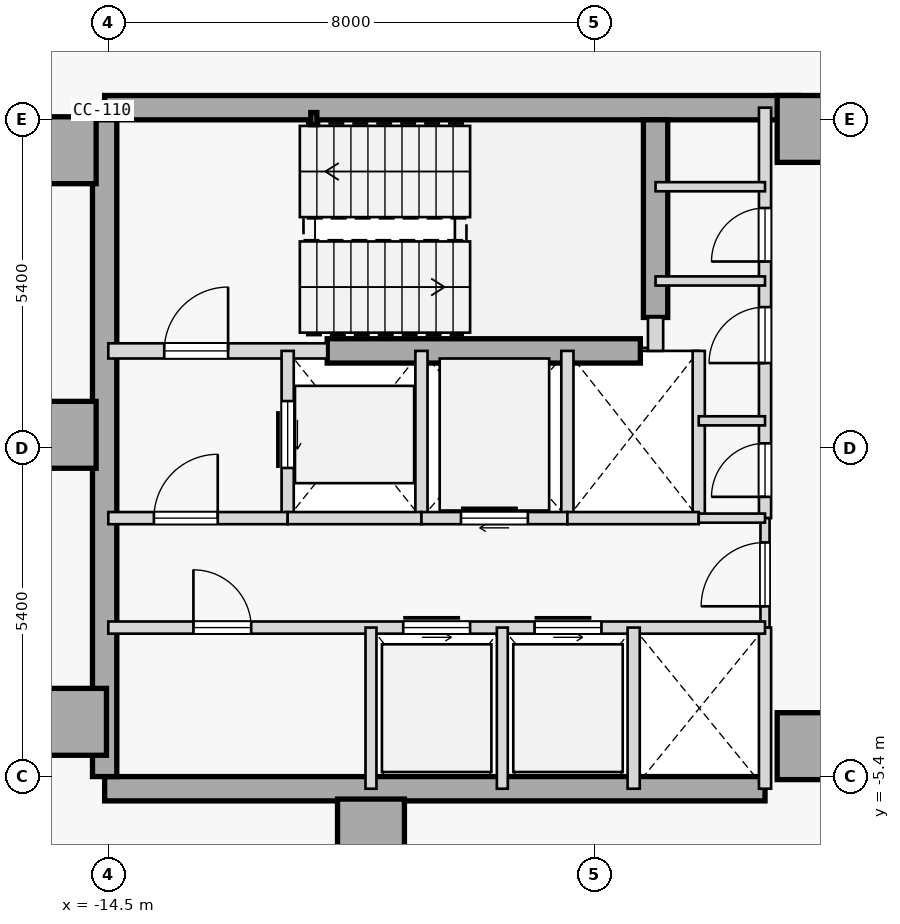
"""IFC4 building model, lengths in metres.
Left out: names, types, materials, properties, quantities, classifications, styles, units other than length and angle.
Written with IfcOpenShell. Run it as: python <this file> out.ifc"""

import sys

from ifc_helpers import new_model, si_unit, direction, frame, frame_2d, origin, origin_2d, place, context, subcontext, project, spatial, rectangle, hollow_rectangle, extrude, element, fill, save


model = new_model("IFC4")
c1 = context("Model", 3, precision=1e-05, world=origin(), true_north=direction((0.0, 1.0)))
c2 = subcontext(c1, "Body", "Model", "MODEL_VIEW")
j1 = project(units=[si_unit("LENGTHUNIT", "METRE"), si_unit("PLANEANGLEUNIT", "RADIAN")], contexts=[c1])
p1 = place(None, origin())
s1 = spatial("IfcSite", under=j1, at=p1, CompositionType="ELEMENT")
p2 = place(p1, origin())
s2 = spatial("IfcBuilding", under=s1, at=p2, CompositionType="ELEMENT")
p3 = place(p2, frame((0.0, 0.0, 131.8)))
s3 = spatial("IfcBuildingStorey", under=s2, at=p3, CompositionType="ELEMENT", Elevation=131.8)
for number, where, z_axis, x_axis in (
    (1, (-15.25, 4.9, 0.0), (0.0, 0.0, 1.0), (1.0, 0.0, 0.0)),
    (2, (-15.25, 0.22, 0.0), (0.0, 0.0, 1.0), (1.0, 0.0, 0.0)),
    (3, (-15.08, -4.5, 0.0), (0.0, 0.0, 1.0), (1.0, 0.0, 0.0)),
    (4, (-10.18, -6.32, 0.0), (0.0, 0.0, 1.0), (1.0, 0.0, 0.0)),
    (5, (-2.95, -4.9, 0.0), (0.0, 0.0, 1.0), (1.0, 0.0, 0.0)),
    (6, (-2.95, 5.25, 0.0), (0.0, 0.0, 1.0), (1.0, 0.0, 0.0)),
):
    element("IfcColumn", number, at=place(p3, frame(where, z_axis=z_axis, x_axis=x_axis)), inside=s3, PredefinedType="COLUMN", context=c2, shape_type="SweptSolid", body=[
        extrude(rectangle(XDim=1.1, YDim=1.1, at=origin_2d()), origin(), (0.0, 0.0, 1.0), 3.7),
    ])
p4 = place(p3, frame((-14.56, 5.6, 0.0), z_axis=(0.0, 0.0, 1.0), x_axis=(1.0, 0.0, 0.0)))
e7 = element("IfcWall", 7, at=p4, inside=s3, PredefinedType="SHEAR", context=c2, shape_type="SweptSolid", body=[
    extrude(rectangle(XDim=11.41, YDim=0.4, at=frame_2d((5.705, 0.0))), origin(), (0.0, 0.0, 1.0), 3.475),
])
p5 = place(p3, frame((-14.56, -5.6, 0.0), z_axis=(0.0, 0.0, 1.0), x_axis=(1.0, 0.0, 0.0)))
e8 = element("IfcWall", 8, at=p5, inside=s3, PredefinedType="SHEAR", context=c2, shape_type="SweptSolid", body=[
    extrude(rectangle(XDim=10.86, YDim=0.4, at=frame_2d((5.43, 0.0))), origin(), (0.0, 0.0, 1.0), 3.475),
])
p6 = place(p3, frame((-14.56, -5.4, 0.0), z_axis=(0.0, 0.0, 1.0), x_axis=(0.0, 1.0, 0.0)))
e9 = element("IfcWall", 9, at=p6, inside=s3, PredefinedType="SHEAR", context=c2, shape_type="SweptSolid", body=[
    extrude(rectangle(XDim=10.8, YDim=0.4, at=frame_2d((5.4, 0.0))), origin(), (0.0, 0.0, 1.0), 3.475),
])
p7 = place(p3, frame((-5.5, 2.15, 0.0), z_axis=(0.0, 0.0, 1.0), x_axis=(0.0, 1.0, 0.0)))
e10 = element("IfcWall", 10, at=p7, inside=s3, PredefinedType="SHEAR", context=c2, shape_type="SweptSolid", body=[
    extrude(rectangle(XDim=3.25, YDim=0.4, at=frame_2d((1.625, 0.0))), origin(), (0.0, 0.0, 1.0), 3.475),
])
p8 = place(p3, frame((-10.9, 1.6, 0.0), z_axis=(0.0, 0.0, 1.0), x_axis=(1.0, 0.0, 0.0)))
e11 = element("IfcWall", 11, at=p8, inside=s3, PredefinedType="SHEAR", context=c2, shape_type="SweptSolid", body=[
    extrude(rectangle(XDim=5.15, YDim=0.4, at=frame_2d((2.575, 0.0))), origin(), (0.0, 0.0, 1.0), 3.475),
])
p9 = place(p3, frame((-11.12, 5.42, 0.0), z_axis=(0.0, 0.0, 1.0), x_axis=(1.0, 0.0, 0.0)))
e12 = element("IfcColumn", 12, at=p9, inside=s3, PredefinedType="COLUMN", context=c2, shape_type="SweptSolid", body=[
    extrude(hollow_rectangle(XDim=0.1, YDim=0.2, WallThickness=0.008, at=origin_2d()), origin(), (0.0, 0.0, 1.0), 3.7),
])
p10 = place(p3, frame((-14.5, 1.6, 0.0), z_axis=(0.0, 0.0, 1.0), x_axis=(1.0, 0.0, 0.0)))
e13 = element("IfcWall", 13, at=p10, inside=s3, PredefinedType="STANDARD", context=c2, shape_type="SweptSolid", body=[
    extrude(rectangle(XDim=3.6, YDim=0.25, at=frame_2d((1.8, 0.0))), origin(), (0.0, 0.0, 1.0), 3.475),
])
p11 = place(p10, frame((0.92, 0.0, 0.0)))
e14 = element("IfcOpeningElement", 14, at=p11, cuts=e13, PredefinedType="OPENING", context=c2, shape_type="SweptSolid", body=[
    extrude(rectangle(XDim=1.05, YDim=2.15, at=frame_2d((0.525, 1.075))), frame((0.0, 0.135, 0.0), z_axis=(0.0, -1.0, 0.0), x_axis=(1.0, 0.0, 0.0)), (0.0, 0.0, 1.0), 0.27),
])
p12 = place(p3, frame((-5.5, 1.6, 0.0), z_axis=(0.0, 0.0, 1.0), x_axis=(0.0, 1.0, 0.0)))
e15 = element("IfcWall", 15, at=p12, inside=s3, PredefinedType="STANDARD", context=c2, shape_type="SweptSolid", body=[
    extrude(rectangle(XDim=0.55, YDim=0.25, at=frame_2d((0.275, 0.0))), origin(), (0.0, 0.0, 1.0), 3.475),
])
p13 = place(p3, frame((-3.7, -1.15, 0.0), z_axis=(0.0, 0.0, 1.0), x_axis=(0.0, 1.0, 0.0)))
e16 = element("IfcWall", 16, at=p13, inside=s3, PredefinedType="STANDARD", context=c2, shape_type="SweptSolid", body=[
    extrude(rectangle(XDim=6.75, YDim=0.2, at=frame_2d((3.375, 0.0))), origin(), (0.0, 0.0, 1.0), 3.475),
])
p14 = place(p13, frame((0.35, 0.0, 0.0)))
e17 = element("IfcOpeningElement", 17, at=p14, cuts=e16, PredefinedType="OPENING", context=c2, shape_type="SweptSolid", body=[
    extrude(rectangle(XDim=0.88, YDim=2.15, at=frame_2d((0.44, 1.075))), frame((0.0, 0.11, 0.0), z_axis=(0.0, -1.0, 0.0), x_axis=(1.0, 0.0, 0.0)), (0.0, 0.0, 1.0), 0.22),
])
p15 = place(p13, frame((2.55, 0.0, 0.0)))
e18 = element("IfcOpeningElement", 18, at=p15, cuts=e16, PredefinedType="OPENING", context=c2, shape_type="SweptSolid", body=[
    extrude(rectangle(XDim=0.92, YDim=2.15, at=frame_2d((0.46, 1.075))), frame((0.0, 0.11, 0.0), z_axis=(0.0, -1.0, 0.0), x_axis=(1.0, 0.0, 0.0)), (0.0, 0.0, 1.0), 0.22),
])
p16 = place(p13, frame((4.22, 0.0, 0.0)))
e19 = element("IfcOpeningElement", 19, at=p16, cuts=e16, PredefinedType="OPENING", context=c2, shape_type="SweptSolid", body=[
    extrude(rectangle(XDim=0.88, YDim=2.15, at=frame_2d((0.44, 1.075))), frame((0.0, 0.11, 0.0), z_axis=(0.0, -1.0, 0.0), x_axis=(1.0, 0.0, 0.0)), (0.0, 0.0, 1.0), 0.22),
])
p17 = place(p3, frame((-3.7, -2.95, 0.0), z_axis=(0.0, 0.0, 1.0), x_axis=(0.0, 1.0, 0.0)))
e20 = element("IfcWall", 20, at=p17, inside=s3, PredefinedType="PARTITIONING", context=c2, shape_type="SweptSolid", body=[
    extrude(rectangle(XDim=1.8, YDim=0.15, at=frame_2d((0.9, 0.0))), origin(), (0.0, 0.0, 1.0), 3.475),
])
p18 = place(p17, frame((0.35, 0.0, 0.0)))
e21 = element("IfcOpeningElement", 21, at=p18, cuts=e20, PredefinedType="OPENING", context=c2, shape_type="SweptSolid", body=[
    extrude(rectangle(XDim=1.05, YDim=2.18, at=frame_2d((0.525, 1.09))), frame((0.0, 0.085, 0.0), z_axis=(0.0, -1.0, 0.0), x_axis=(1.0, 0.0, 0.0)), (0.0, 0.0, 1.0), 0.17),
])
p19 = place(p3, frame((-3.7, -5.6, 0.0), z_axis=(0.0, 0.0, 1.0), x_axis=(0.0, 1.0, 0.0)))
e22 = element("IfcWall", 22, at=p19, inside=s3, PredefinedType="STANDARD", context=c2, shape_type="SweptSolid", body=[
    extrude(rectangle(XDim=2.65, YDim=0.2, at=frame_2d((1.325, 0.0))), origin(), (0.0, 0.0, 1.0), 3.475),
])
p20 = place(p3, frame((-11.55, -1.15, 0.0), z_axis=(0.0, 0.0, 1.0), x_axis=(0.0, 1.0, 0.0)))
e23 = element("IfcWall", 23, at=p20, inside=s3, PredefinedType="STANDARD", context=c2, shape_type="SweptSolid", body=[
    extrude(rectangle(XDim=2.75, YDim=0.2, at=frame_2d((1.375, 0.0))), origin(), (0.0, 0.0, 1.0), 3.475),
])
p21 = place(p20, frame((0.825, 0.0, 0.0)))
e24 = element("IfcOpeningElement", 24, at=p21, cuts=e23, PredefinedType="OPENING", context=c2, shape_type="SweptSolid", body=[
    extrude(rectangle(XDim=1.1, YDim=2.15, at=frame_2d((0.55, 1.075))), frame((0.0, 0.11, 0.0), z_axis=(0.0, -1.0, 0.0), x_axis=(1.0, 0.0, 0.0)), (0.0, 0.0, 1.0), 0.22),
])
p22 = place(p3, frame((-9.35, -1.15, 0.0), z_axis=(0.0, 0.0, 1.0), x_axis=(0.0, 1.0, 0.0)))
e25 = element("IfcWall", 25, at=p22, inside=s3, PredefinedType="STANDARD", context=c2, shape_type="SweptSolid", body=[
    extrude(rectangle(XDim=2.75, YDim=0.2, at=frame_2d((1.375, 0.0))), origin(), (0.0, 0.0, 1.0), 3.475),
])
p23 = place(p3, frame((-14.5, -1.15, 0.0), z_axis=(0.0, 0.0, 1.0), x_axis=(1.0, 0.0, 0.0)))
e26 = element("IfcWall", 26, at=p23, inside=s3, PredefinedType="STANDARD", context=c2, shape_type="SweptSolid", body=[
    extrude(rectangle(XDim=2.95, YDim=0.2, at=frame_2d((1.475, 0.0))), origin(), (0.0, 0.0, 1.0), 3.475),
])
p24 = place(p23, frame((0.75, 0.0, 0.0)))
e27 = element("IfcOpeningElement", 27, at=p24, cuts=e26, PredefinedType="OPENING", context=c2, shape_type="SweptSolid", body=[
    extrude(rectangle(XDim=1.05, YDim=2.18, at=frame_2d((0.525, 1.09))), frame((0.0, 0.11, 0.0), z_axis=(0.0, -1.0, 0.0), x_axis=(1.0, 0.0, 0.0)), (0.0, 0.0, 1.0), 0.22),
])
p25 = place(p3, frame((-11.55, -1.15, 0.0), z_axis=(0.0, 0.0, 1.0), x_axis=(1.0, 0.0, 0.0)))
e28 = element("IfcWall", 28, at=p25, inside=s3, PredefinedType="STANDARD", context=c2, shape_type="SweptSolid", body=[
    extrude(rectangle(XDim=2.2, YDim=0.2, at=frame_2d((1.1, 0.0))), origin(), (0.0, 0.0, 1.0), 3.475),
])
p26 = place(p3, frame((-6.95, -1.15, 0.0), z_axis=(0.0, 0.0, 1.0), x_axis=(0.0, 1.0, 0.0)))
e29 = element("IfcWall", 29, at=p26, inside=s3, PredefinedType="STANDARD", context=c2, shape_type="SweptSolid", body=[
    extrude(rectangle(XDim=2.75, YDim=0.2, at=frame_2d((1.375, 0.0))), origin(), (0.0, 0.0, 1.0), 3.475),
])
p27 = place(p3, frame((-9.35, -1.15, 0.0), z_axis=(0.0, 0.0, 1.0), x_axis=(1.0, 0.0, 0.0)))
e30 = element("IfcWall", 30, at=p27, inside=s3, PredefinedType="STANDARD", context=c2, shape_type="SweptSolid", body=[
    extrude(rectangle(XDim=2.4, YDim=0.2, at=frame_2d((1.2, 0.0))), origin(), (0.0, 0.0, 1.0), 3.475),
])
p28 = place(p27, frame((0.65, 0.0, 0.0)))
e31 = element("IfcOpeningElement", 31, at=p28, cuts=e30, PredefinedType="OPENING", context=c2, shape_type="SweptSolid", body=[
    extrude(rectangle(XDim=1.1, YDim=2.15, at=frame_2d((0.55, 1.075))), frame((0.0, 0.11, 0.0), z_axis=(0.0, -1.0, 0.0), x_axis=(1.0, 0.0, 0.0)), (0.0, 0.0, 1.0), 0.22),
])
p29 = place(p3, frame((-4.79, -1.15, 0.0), z_axis=(0.0, 0.0, 1.0), x_axis=(0.0, 1.0, 0.0)))
e32 = element("IfcWall", 32, at=p29, inside=s3, PredefinedType="STANDARD", context=c2, shape_type="SweptSolid", body=[
    extrude(rectangle(XDim=2.75, YDim=0.2, at=frame_2d((1.375, 0.0))), origin(), (0.0, 0.0, 1.0), 3.475),
])
p30 = place(p3, frame((-6.95, -1.15, 0.0), z_axis=(0.0, 0.0, 1.0), x_axis=(1.0, 0.0, 0.0)))
e33 = element("IfcWall", 33, at=p30, inside=s3, PredefinedType="STANDARD", context=c2, shape_type="SweptSolid", body=[
    extrude(rectangle(XDim=2.16, YDim=0.2, at=frame_2d((1.08, 0.0))), origin(), (0.0, 0.0, 1.0), 3.475),
])
p31 = place(p3, frame((-4.79, -1.15, 0.0), z_axis=(0.0, 0.0, 1.0), x_axis=(1.0, 0.0, 0.0)))
e34 = element("IfcWall", 34, at=p31, inside=s3, PredefinedType="PARTITIONING", context=c2, shape_type="SweptSolid", body=[
    extrude(rectangle(XDim=1.09, YDim=0.15, at=frame_2d((0.545, 0.0))), origin(), (0.0, 0.0, 1.0), 3.475),
])
p32 = place(p3, frame((-14.5, -2.95, 0.0), z_axis=(0.0, 0.0, 1.0), x_axis=(1.0, 0.0, 0.0)))
e35 = element("IfcWall", 35, at=p32, inside=s3, PredefinedType="STANDARD", context=c2, shape_type="SweptSolid", body=[
    extrude(rectangle(XDim=10.8, YDim=0.2, at=frame_2d((5.4, 0.0))), origin(), (0.0, 0.0, 1.0), 3.475),
])
p33 = place(p32, frame((4.85, 0.0, 0.0)))
e36 = element("IfcOpeningElement", 36, at=p33, cuts=e35, PredefinedType="OPENING", context=c2, shape_type="SweptSolid", body=[
    extrude(rectangle(XDim=1.1, YDim=2.15, at=frame_2d((0.55, 1.075))), frame((0.0, 0.11, 0.0), z_axis=(0.0, -1.0, 0.0), x_axis=(1.0, 0.0, 0.0)), (0.0, 0.0, 1.0), 0.22),
])
p34 = place(p32, frame((7.01, 0.0, 0.0)))
e37 = element("IfcOpeningElement", 37, at=p34, cuts=e35, PredefinedType="OPENING", context=c2, shape_type="SweptSolid", body=[
    extrude(rectangle(XDim=1.1, YDim=2.15, at=frame_2d((0.55, 1.075))), frame((0.0, 0.11, 0.0), z_axis=(0.0, -1.0, 0.0), x_axis=(1.0, 0.0, 0.0)), (0.0, 0.0, 1.0), 0.22),
])
p35 = place(p32, frame((1.4, 0.0, 0.0)))
e38 = element("IfcOpeningElement", 38, at=p35, cuts=e35, PredefinedType="OPENING", context=c2, shape_type="SweptSolid", body=[
    extrude(rectangle(XDim=0.95, YDim=2.15, at=frame_2d((0.475, 1.075))), frame((0.0, 0.11, 0.0), z_axis=(0.0, -1.0, 0.0), x_axis=(1.0, 0.0, 0.0)), (0.0, 0.0, 1.0), 0.22),
])
p36 = place(p3, frame((-5.86, -5.6, 0.0), z_axis=(0.0, 0.0, 1.0), x_axis=(0.0, 1.0, 0.0)))
e39 = element("IfcWall", 39, at=p36, inside=s3, PredefinedType="STANDARD", context=c2, shape_type="SweptSolid", body=[
    extrude(rectangle(XDim=2.65, YDim=0.2, at=frame_2d((1.325, 0.0))), origin(), (0.0, 0.0, 1.0), 3.475),
])
for number, where, z_axis, x_axis in (
    (40, (-10.18, -5.6, 0.0), (0.0, 0.0, 1.0), (0.0, 1.0, 0.0)),
    (41, (-8.02, -5.6, 0.0), (0.0, 0.0, 1.0), (0.0, 1.0, 0.0)),
):
    element("IfcWall", number, at=place(p3, frame(where, z_axis=z_axis, x_axis=x_axis)), inside=s3, PredefinedType="STANDARD", context=c2, shape_type="SweptSolid", body=[
        extrude(rectangle(XDim=2.65, YDim=0.18, at=frame_2d((1.325, 0.0))), origin(), (0.0, 0.0, 1.0), 3.475),
    ])
p37 = place(p3, frame((-5.5, 4.3, 0.0), z_axis=(0.0, 0.0, 1.0), x_axis=(1.0, 0.0, 0.0)))
e42 = element("IfcWall", 42, at=p37, inside=s3, PredefinedType="PARTITIONING", context=c2, shape_type="SweptSolid", body=[
    extrude(rectangle(XDim=1.8, YDim=0.15, at=frame_2d((0.9, 0.0))), origin(), (0.0, 0.0, 1.0), 3.475),
])
p38 = place(p3, frame((-4.79, 0.45, 0.0), z_axis=(0.0, 0.0, 1.0), x_axis=(1.0, 0.0, 0.0)))
e43 = element("IfcWall", 43, at=p38, inside=s3, PredefinedType="PARTITIONING", context=c2, shape_type="SweptSolid", body=[
    extrude(rectangle(XDim=1.09, YDim=0.15, at=frame_2d((0.545, 0.0))), origin(), (0.0, 0.0, 1.0), 3.475),
])
p39 = place(p3, frame((-5.5, 2.75, 0.0), z_axis=(0.0, 0.0, 1.0), x_axis=(1.0, 0.0, 0.0)))
e44 = element("IfcWall", 44, at=p39, inside=s3, PredefinedType="PARTITIONING", context=c2, shape_type="SweptSolid", body=[
    extrude(rectangle(XDim=1.8, YDim=0.15, at=frame_2d((0.9, 0.0))), origin(), (0.0, 0.0, 1.0), 3.475),
])
p40 = place(p11, origin())
e45 = element("IfcDoor", 45, at=p40, inside=s3, OperationType="SINGLE_SWING_RIGHT", PredefinedType="DOOR", context=c2, shape_type="SweptSolid", body=[
    extrude(rectangle(XDim=1.05, YDim=2.15, at=frame_2d((0.525, 1.075))), frame((0.0, 0.025, 0.0), z_axis=(0.0, -1.0, 0.0), x_axis=(1.0, 0.0, 0.0)), (0.0, 0.0, 1.0), 0.05),
])
fill(e14, e45)
p41 = place(p24, origin())
e46 = element("IfcDoor", 46, at=p41, inside=s3, OperationType="SINGLE_SWING_RIGHT", PredefinedType="DOOR", context=c2, shape_type="SweptSolid", body=[
    extrude(rectangle(XDim=1.05, YDim=2.18, at=frame_2d((0.525, 1.09))), frame((0.0, 0.025, 0.0), z_axis=(0.0, -1.0, 0.0), x_axis=(1.0, 0.0, 0.0)), (0.0, 0.0, 1.0), 0.05),
])
fill(e27, e46)
p42 = place(p18, origin())
e47 = element("IfcDoor", 47, at=p42, inside=s3, OperationType="SINGLE_SWING_LEFT", PredefinedType="DOOR", context=c2, shape_type="SweptSolid", body=[
    extrude(rectangle(XDim=1.05, YDim=2.18, at=frame_2d((0.525, 1.09))), frame((0.0, 0.025, 0.0), z_axis=(0.0, -1.0, 0.0), x_axis=(1.0, 0.0, 0.0)), (0.0, 0.0, 1.0), 0.05),
])
fill(e21, e47)
p43 = place(p21, origin())
e48 = element("IfcDoor", 48, at=p43, inside=s3, OperationType="SLIDING_TO_RIGHT", PredefinedType="DOOR", context=c2, shape_type="SweptSolid", body=[
    extrude(rectangle(XDim=1.1, YDim=2.15, at=frame_2d((0.55, 1.075))), frame((0.0, 0.025, 0.0), z_axis=(0.0, -1.0, 0.0), x_axis=(1.0, 0.0, 0.0)), (0.0, 0.0, 1.0), 0.05),
])
fill(e24, e48)
p44 = place(p28, origin())
e49 = element("IfcDoor", 49, at=p44, inside=s3, OperationType="SLIDING_TO_RIGHT", PredefinedType="DOOR", context=c2, shape_type="SweptSolid", body=[
    extrude(rectangle(XDim=1.1, YDim=2.15, at=frame_2d((0.55, 1.075))), frame((0.0, 0.025, 0.0), z_axis=(0.0, -1.0, 0.0), x_axis=(1.0, 0.0, 0.0)), (0.0, 0.0, 1.0), 0.05),
])
fill(e31, e49)
p45 = place(p33, origin())
e50 = element("IfcDoor", 50, at=p45, inside=s3, OperationType="SLIDING_TO_LEFT", PredefinedType="DOOR", context=c2, shape_type="SweptSolid", body=[
    extrude(rectangle(XDim=1.1, YDim=2.15, at=frame_2d((0.55, 1.075))), frame((0.0, 0.025, 0.0), z_axis=(0.0, -1.0, 0.0), x_axis=(1.0, 0.0, 0.0)), (0.0, 0.0, 1.0), 0.05),
])
fill(e36, e50)
p46 = place(p34, origin())
e51 = element("IfcDoor", 51, at=p46, inside=s3, OperationType="SLIDING_TO_LEFT", PredefinedType="DOOR", context=c2, shape_type="SweptSolid", body=[
    extrude(rectangle(XDim=1.1, YDim=2.15, at=frame_2d((0.55, 1.075))), frame((0.0, 0.025, 0.0), z_axis=(0.0, -1.0, 0.0), x_axis=(1.0, 0.0, 0.0)), (0.0, 0.0, 1.0), 0.05),
])
fill(e37, e51)
p47 = place(p35, origin())
e52 = element("IfcDoor", 52, at=p47, inside=s3, OperationType="SINGLE_SWING_LEFT", PredefinedType="DOOR", context=c2, shape_type="SweptSolid", body=[
    extrude(rectangle(XDim=0.95, YDim=2.15, at=frame_2d((0.475, 1.075))), frame((0.0, 0.025, 0.0), z_axis=(0.0, -1.0, 0.0), x_axis=(1.0, 0.0, 0.0)), (0.0, 0.0, 1.0), 0.05),
])
fill(e38, e52)
p48 = place(p14, origin())
e53 = element("IfcDoor", 53, at=p48, inside=s3, OperationType="SINGLE_SWING_LEFT", PredefinedType="DOOR", context=c2, shape_type="SweptSolid", body=[
    extrude(rectangle(XDim=0.88, YDim=2.15, at=frame_2d((0.44, 1.075))), frame((0.0, 0.025, 0.0), z_axis=(0.0, -1.0, 0.0), x_axis=(1.0, 0.0, 0.0)), (0.0, 0.0, 1.0), 0.05),
])
fill(e17, e53)
p49 = place(p15, origin())
e54 = element("IfcDoor", 54, at=p49, inside=s3, OperationType="SINGLE_SWING_LEFT", PredefinedType="DOOR", context=c2, shape_type="SweptSolid", body=[
    extrude(rectangle(XDim=0.92, YDim=2.15, at=frame_2d((0.46, 1.075))), frame((0.0, 0.025, 0.0), z_axis=(0.0, -1.0, 0.0), x_axis=(1.0, 0.0, 0.0)), (0.0, 0.0, 1.0), 0.05),
])
fill(e18, e54)
p50 = place(p16, origin())
e55 = element("IfcDoor", 55, at=p50, inside=s3, OperationType="SINGLE_SWING_LEFT", PredefinedType="DOOR", context=c2, shape_type="SweptSolid", body=[
    extrude(rectangle(XDim=0.88, YDim=2.15, at=frame_2d((0.44, 1.075))), frame((0.0, 0.025, 0.0), z_axis=(0.0, -1.0, 0.0), x_axis=(1.0, 0.0, 0.0)), (0.0, 0.0, 1.0), 0.05),
])
fill(e19, e55)
save(model, sys.argv[1])
